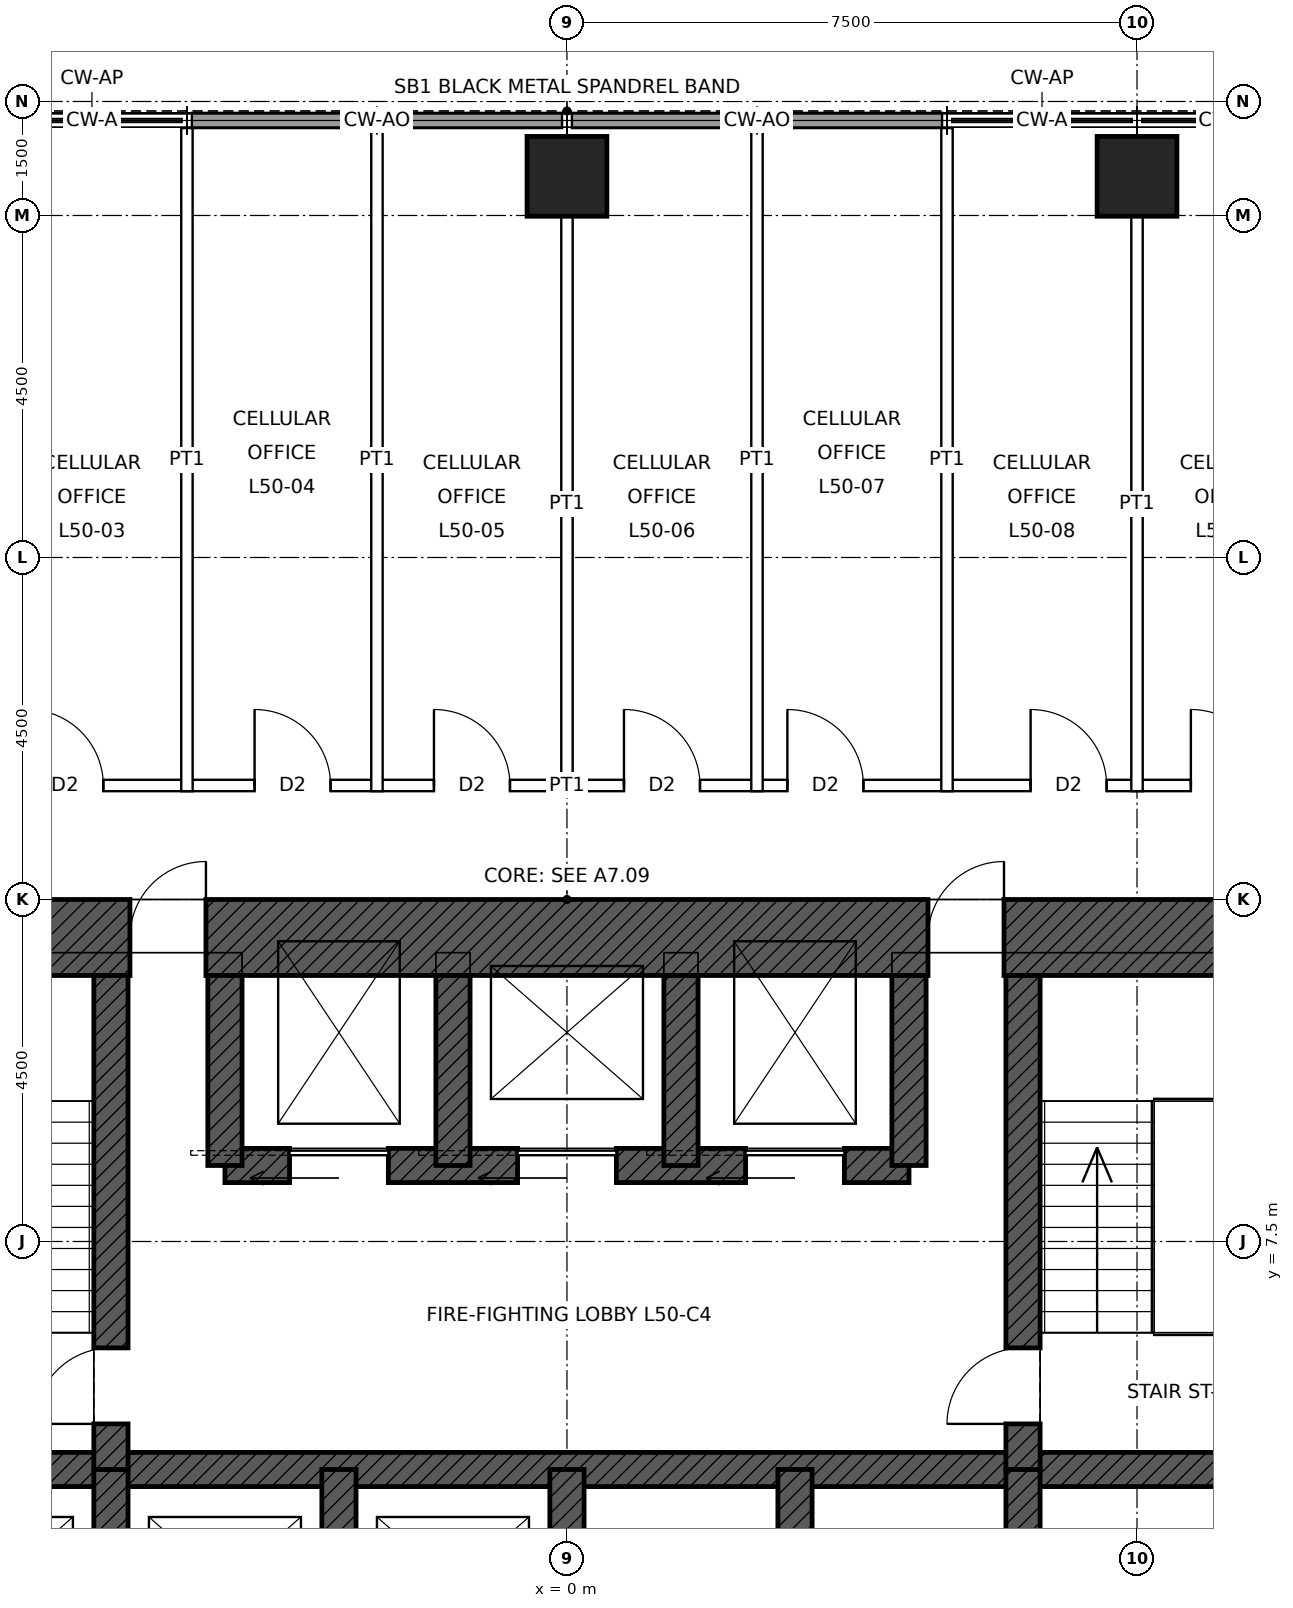
"""IFC4 building model, lengths in metres.
Left out: names, types, materials, properties, quantities, classifications, styles, units other than length and angle.
Written with IfcOpenShell. Run it as: python <this file> out.ifc"""

import sys

from ifc_helpers import new_model, si_unit, direction, frame, frame_2d, origin, origin_2d, place, context, subcontext, project, spatial, rectangle, hollow_rectangle, extrude, element, fill, save


model = new_model("IFC4")
c1 = context("Model", 3, precision=1e-05, world=origin(), true_north=direction((0.0, 1.0)))
c2 = subcontext(c1, "Body", "Model", "MODEL_VIEW")
j1 = project(units=[si_unit("LENGTHUNIT", "METRE"), si_unit("PLANEANGLEUNIT", "RADIAN")], contexts=[c1])
p1 = place(None, origin())
s1 = spatial("IfcSite", under=j1, at=p1, CompositionType="ELEMENT")
p2 = place(p1, origin())
s2 = spatial("IfcBuilding", under=s1, at=p2, CompositionType="ELEMENT")
p3 = place(p2, frame((0.0, 0.0, 233.9)))
s3 = spatial("IfcBuildingStorey", under=s2, at=p3, CompositionType="ELEMENT", Elevation=233.9)
for number, where, z_axis, x_axis in (
    (1, (0.0, 21.515, 0.0), (0.0, 0.0, 1.0), (1.0, 0.0, 0.0)),
    (2, (7.5, 21.515, 0.0), (0.0, 0.0, 1.0), (1.0, 0.0, 0.0)),
):
    element("IfcColumn", number, at=place(p3, frame(where, z_axis=z_axis, x_axis=x_axis)), inside=s3, PredefinedType="COLUMN", context=c2, shape_type="SweptSolid", body=[
        extrude(hollow_rectangle(XDim=1.05, YDim=1.05, WallThickness=0.07, at=origin_2d()), origin(), (0.0, 0.0, 1.0), 4.0),
    ])
p4 = place(p3, frame((-12.0, 11.5, 0.0), z_axis=(0.0, 0.0, 1.0), x_axis=(1.0, 0.0, 0.0)))
e3 = element("IfcWall", 3, at=p4, inside=s3, PredefinedType="SHEAR", context=c2, shape_type="SweptSolid", body=[
    extrude(rectangle(XDim=24.0, YDim=1.0, at=frame_2d((12.0, 0.0))), origin(), (0.0, 0.0, 1.0), 4.0),
])
p5 = place(p4, frame((6.25, 0.0, 0.0)))
e4 = element("IfcOpeningElement", 4, at=p5, cuts=e3, PredefinedType="OPENING", context=c2, shape_type="SweptSolid", body=[
    extrude(rectangle(XDim=1.0, YDim=2.4, at=frame_2d((0.5, 1.2))), frame((0.0, 0.51, 0.0), z_axis=(0.0, -1.0, 0.0), x_axis=(1.0, 0.0, 0.0)), (0.0, 0.0, 1.0), 1.02),
])
p6 = place(p4, frame((16.75, 0.0, 0.0)))
e5 = element("IfcOpeningElement", 5, at=p6, cuts=e3, PredefinedType="OPENING", context=c2, shape_type="SweptSolid", body=[
    extrude(rectangle(XDim=1.0, YDim=2.4, at=frame_2d((0.5, 1.2))), frame((0.0, 0.51, 0.0), z_axis=(0.0, -1.0, 0.0), x_axis=(1.0, 0.0, 0.0)), (0.0, 0.0, 1.0), 1.02),
])
p7 = place(p3, frame((-11.0, 4.5, 0.0), z_axis=(0.0, 0.0, 1.0), x_axis=(1.0, 0.0, 0.0)))
e6 = element("IfcWall", 6, at=p7, inside=s3, PredefinedType="SHEAR", context=c2, shape_type="SweptSolid", body=[
    extrude(rectangle(XDim=22.0, YDim=0.45, at=frame_2d((11.0, 0.0))), origin(), (0.0, 0.0, 1.0), 4.0),
])
p8 = place(p7, frame((0.4, 0.0, 0.0)))
e7 = element("IfcOpeningElement", 7, at=p8, cuts=e6, PredefinedType="OPENING", context=c2, shape_type="SweptSolid", body=[
    extrude(rectangle(XDim=1.0, YDim=2.1, at=frame_2d((0.5, 1.05))), frame((0.0, 0.235, 0.0), z_axis=(0.0, -1.0, 0.0), x_axis=(1.0, 0.0, 0.0)), (0.0, 0.0, 1.0), 0.47),
])
p9 = place(p7, frame((20.6, 0.0, 0.0)))
e8 = element("IfcOpeningElement", 8, at=p9, cuts=e6, PredefinedType="OPENING", context=c2, shape_type="SweptSolid", body=[
    extrude(rectangle(XDim=1.0, YDim=2.1, at=frame_2d((0.5, 1.05))), frame((0.0, 0.235, 0.0), z_axis=(0.0, -1.0, 0.0), x_axis=(1.0, 0.0, 0.0)), (0.0, 0.0, 1.0), 0.47),
])
p10 = place(p3, frame((-4.5, 8.5, 0.0), z_axis=(0.0, 0.0, 1.0), x_axis=(1.0, 0.0, 0.0)))
e9 = element("IfcWall", 9, at=p10, inside=s3, PredefinedType="SHEAR", context=c2, shape_type="SweptSolid", body=[
    extrude(rectangle(XDim=9.0, YDim=0.45, at=frame_2d((4.5, 0.0))), origin(), (0.0, 0.0, 1.0), 4.0),
])
p11 = place(p10, frame((0.85, 0.0, 0.0)))
e10 = element("IfcOpeningElement", 10, at=p11, cuts=e9, PredefinedType="OPENING", context=c2, shape_type="SweptSolid", body=[
    extrude(rectangle(XDim=1.3, YDim=2.4, at=frame_2d((0.65, 1.2))), frame((0.0, 0.235, 0.0), z_axis=(0.0, -1.0, 0.0), x_axis=(1.0, 0.0, 0.0)), (0.0, 0.0, 1.0), 0.47),
])
p12 = place(p10, frame((6.85, 0.0, 0.0)))
e11 = element("IfcOpeningElement", 11, at=p12, cuts=e9, PredefinedType="OPENING", context=c2, shape_type="SweptSolid", body=[
    extrude(rectangle(XDim=1.3, YDim=2.4, at=frame_2d((0.65, 1.2))), frame((0.0, 0.235, 0.0), z_axis=(0.0, -1.0, 0.0), x_axis=(1.0, 0.0, 0.0)), (0.0, 0.0, 1.0), 0.47),
])
p13 = place(p10, frame((3.85, 0.0, 0.0)))
e12 = element("IfcOpeningElement", 12, at=p13, cuts=e9, PredefinedType="OPENING", context=c2, shape_type="SweptSolid", body=[
    extrude(rectangle(XDim=1.3, YDim=2.4, at=frame_2d((0.65, 1.2))), frame((0.0, 0.235, 0.0), z_axis=(0.0, -1.0, 0.0), x_axis=(1.0, 0.0, 0.0)), (0.0, 0.0, 1.0), 0.47),
])
for number, where, z_axis, x_axis in (
    (13, (-6.0, 1.5, 0.0), (0.0, 0.0, 1.0), (0.0, 1.0, 0.0)),
    (14, (-3.0, 1.5, 0.0), (0.0, 0.0, 1.0), (0.0, 1.0, 0.0)),
    (15, (0.0, 1.5, 0.0), (0.0, 0.0, 1.0), (0.0, 1.0, 0.0)),
    (16, (3.0, 1.5, 0.0), (0.0, 0.0, 1.0), (0.0, 1.0, 0.0)),
    (17, (6.0, 1.5, 0.0), (0.0, 0.0, 1.0), (0.0, 1.0, 0.0)),
):
    element("IfcWall", number, at=place(p3, frame(where, z_axis=z_axis, x_axis=x_axis)), inside=s3, PredefinedType="SHEAR", context=c2, shape_type="SweptSolid", body=[
        extrude(rectangle(XDim=3.0, YDim=0.45, at=frame_2d((1.5, 0.0))), origin(), (0.0, 0.0, 1.0), 4.0),
    ])
p14 = place(p3, frame((-6.0, 4.5, 0.0), z_axis=(0.0, 0.0, 1.0), x_axis=(0.0, 1.0, 0.0)))
e18 = element("IfcWall", 18, at=p14, inside=s3, PredefinedType="SHEAR", context=c2, shape_type="SweptSolid", body=[
    extrude(rectangle(XDim=6.5, YDim=0.45, at=frame_2d((3.25, 0.0))), origin(), (0.0, 0.0, 1.0), 4.0),
])
p15 = place(p14, frame((0.6, 0.0, 0.0)))
e19 = element("IfcOpeningElement", 19, at=p15, cuts=e18, PredefinedType="OPENING", context=c2, shape_type="SweptSolid", body=[
    extrude(rectangle(XDim=1.0, YDim=2.1, at=frame_2d((0.5, 1.05))), frame((0.0, 0.235, 0.0), z_axis=(0.0, -1.0, 0.0), x_axis=(1.0, 0.0, 0.0)), (0.0, 0.0, 1.0), 0.47),
])
p16 = place(p3, frame((6.0, 4.5, 0.0), z_axis=(0.0, 0.0, 1.0), x_axis=(0.0, 1.0, 0.0)))
e20 = element("IfcWall", 20, at=p16, inside=s3, PredefinedType="SHEAR", context=c2, shape_type="SweptSolid", body=[
    extrude(rectangle(XDim=6.5, YDim=0.45, at=frame_2d((3.25, 0.0))), origin(), (0.0, 0.0, 1.0), 4.0),
])
p17 = place(p16, frame((0.6, 0.0, 0.0)))
e21 = element("IfcOpeningElement", 21, at=p17, cuts=e20, PredefinedType="OPENING", context=c2, shape_type="SweptSolid", body=[
    extrude(rectangle(XDim=1.0, YDim=2.1, at=frame_2d((0.5, 1.05))), frame((0.0, 0.235, 0.0), z_axis=(0.0, -1.0, 0.0), x_axis=(1.0, 0.0, 0.0)), (0.0, 0.0, 1.0), 0.47),
])
for number, where, z_axis, x_axis in (
    (22, (-4.5, 8.5, 0.0), (0.0, 0.0, 1.0), (0.0, 1.0, 0.0)),
    (23, (4.5, 8.5, 0.0), (0.0, 0.0, 1.0), (0.0, 1.0, 0.0)),
    (24, (-1.5, 8.5, 0.0), (0.0, 0.0, 1.0), (0.0, 1.0, 0.0)),
    (25, (1.5, 8.5, 0.0), (0.0, 0.0, 1.0), (0.0, 1.0, 0.0)),
):
    element("IfcWall", number, at=place(p3, frame(where, z_axis=z_axis, x_axis=x_axis)), inside=s3, PredefinedType="SHEAR", context=c2, shape_type="SweptSolid", body=[
        extrude(rectangle(XDim=2.5, YDim=0.45, at=frame_2d((1.25, 0.0))), origin(), (0.0, 0.0, 1.0), 4.0),
    ])
for number, where, z_axis, x_axis in (
    (26, (-4.935, 22.25, 0.0), (0.0, 0.0, 1.0), (1.0, 0.0, 0.0)),
    (27, (-2.468, 22.25, 0.0), (0.0, 0.0, 1.0), (1.0, 0.0, 0.0)),
    (28, (0.065, 22.25, 0.0), (0.0, 0.0, 1.0), (1.0, 0.0, 0.0)),
    (29, (2.532, 22.25, 0.0), (0.0, 0.0, 1.0), (1.0, 0.0, 0.0)),
):
    element("IfcWall", number, at=place(p3, frame(where, z_axis=z_axis, x_axis=x_axis)), inside=s3, PredefinedType="SOLIDWALL", context=c2, shape_type="SweptSolid", body=[
        extrude(rectangle(XDim=2.403, YDim=0.2, at=frame_2d((1.201, 0.0))), origin(), (0.0, 0.0, 1.0), 3.85),
    ])
p18 = place(p3, frame((-13.575, 13.5, 0.0), z_axis=(0.0, 0.0, 1.0), x_axis=(1.0, 0.0, 0.0)))
e30 = element("IfcWall", 30, at=p18, inside=s3, PredefinedType="PARTITIONING", context=c2, shape_type="SweptSolid", body=[
    extrude(rectangle(XDim=27.15, YDim=0.15, at=frame_2d((13.575, 0.0))), origin(), (0.0, 0.0, 1.0), 3.85),
])
p19 = place(p18, frame((4.366, 0.0, 0.0)))
e31 = element("IfcOpeningElement", 31, at=p19, cuts=e30, PredefinedType="OPENING", context=c2, shape_type="SweptSolid", body=[
    extrude(rectangle(XDim=1.0, YDim=2.1, at=frame_2d((0.5, 1.05))), frame((0.0, 0.085, 0.0), z_axis=(0.0, -1.0, 0.0), x_axis=(1.0, 0.0, 0.0)), (0.0, 0.0, 1.0), 0.17),
])
p20 = place(p18, frame((6.475, 0.0, 0.0)))
e32 = element("IfcOpeningElement", 32, at=p20, cuts=e30, PredefinedType="OPENING", context=c2, shape_type="SweptSolid", body=[
    extrude(rectangle(XDim=1.0, YDim=2.1, at=frame_2d((0.5, 1.05))), frame((0.0, 0.085, 0.0), z_axis=(0.0, -1.0, 0.0), x_axis=(1.0, 0.0, 0.0)), (0.0, 0.0, 1.0), 0.17),
])
p21 = place(p18, frame((9.465, 0.0, 0.0)))
e33 = element("IfcOpeningElement", 33, at=p21, cuts=e30, PredefinedType="OPENING", context=c2, shape_type="SweptSolid", body=[
    extrude(rectangle(XDim=1.0, YDim=2.1, at=frame_2d((0.5, 1.05))), frame((0.0, 0.085, 0.0), z_axis=(0.0, -1.0, 0.0), x_axis=(1.0, 0.0, 0.0)), (0.0, 0.0, 1.0), 0.17),
])
p22 = place(p18, frame((11.825, 0.0, 0.0)))
e34 = element("IfcOpeningElement", 34, at=p22, cuts=e30, PredefinedType="OPENING", context=c2, shape_type="SweptSolid", body=[
    extrude(rectangle(XDim=1.0, YDim=2.1, at=frame_2d((0.5, 1.05))), frame((0.0, 0.085, 0.0), z_axis=(0.0, -1.0, 0.0), x_axis=(1.0, 0.0, 0.0)), (0.0, 0.0, 1.0), 0.17),
])
p23 = place(p18, frame((14.325, 0.0, 0.0)))
e35 = element("IfcOpeningElement", 35, at=p23, cuts=e30, PredefinedType="OPENING", context=c2, shape_type="SweptSolid", body=[
    extrude(rectangle(XDim=1.0, YDim=2.1, at=frame_2d((0.5, 1.05))), frame((0.0, 0.085, 0.0), z_axis=(0.0, -1.0, 0.0), x_axis=(1.0, 0.0, 0.0)), (0.0, 0.0, 1.0), 0.17),
])
p24 = place(p18, frame((16.475, 0.0, 0.0)))
e36 = element("IfcOpeningElement", 36, at=p24, cuts=e30, PredefinedType="OPENING", context=c2, shape_type="SweptSolid", body=[
    extrude(rectangle(XDim=1.0, YDim=2.1, at=frame_2d((0.5, 1.05))), frame((0.0, 0.085, 0.0), z_axis=(0.0, -1.0, 0.0), x_axis=(1.0, 0.0, 0.0)), (0.0, 0.0, 1.0), 0.17),
])
p25 = place(p18, frame((19.675, 0.0, 0.0)))
e37 = element("IfcOpeningElement", 37, at=p25, cuts=e30, PredefinedType="OPENING", context=c2, shape_type="SweptSolid", body=[
    extrude(rectangle(XDim=1.0, YDim=2.1, at=frame_2d((0.5, 1.05))), frame((0.0, 0.085, 0.0), z_axis=(0.0, -1.0, 0.0), x_axis=(1.0, 0.0, 0.0)), (0.0, 0.0, 1.0), 0.17),
])
p26 = place(p18, frame((21.783, 0.0, 0.0)))
e38 = element("IfcOpeningElement", 38, at=p26, cuts=e30, PredefinedType="OPENING", context=c2, shape_type="SweptSolid", body=[
    extrude(rectangle(XDim=1.0, YDim=2.1, at=frame_2d((0.5, 1.05))), frame((0.0, 0.085, 0.0), z_axis=(0.0, -1.0, 0.0), x_axis=(1.0, 0.0, 0.0)), (0.0, 0.0, 1.0), 0.17),
])
p27 = place(p18, frame((24.783, 0.0, 0.0)))
e39 = element("IfcOpeningElement", 39, at=p27, cuts=e30, PredefinedType="OPENING", context=c2, shape_type="SweptSolid", body=[
    extrude(rectangle(XDim=1.0, YDim=2.4, at=frame_2d((0.5, 1.2))), frame((0.0, 0.085, 0.0), z_axis=(0.0, -1.0, 0.0), x_axis=(1.0, 0.0, 0.0)), (0.0, 0.0, 1.0), 0.17),
])
p28 = place(p18, frame((1.366, 0.0, 0.0)))
e40 = element("IfcOpeningElement", 40, at=p28, cuts=e30, PredefinedType="OPENING", context=c2, shape_type="SweptSolid", body=[
    extrude(rectangle(XDim=1.0, YDim=2.4, at=frame_2d((0.5, 1.2))), frame((0.0, 0.085, 0.0), z_axis=(0.0, -1.0, 0.0), x_axis=(1.0, 0.0, 0.0)), (0.0, 0.0, 1.0), 0.17),
])
for number, where, z_axis, x_axis in (
    (41, (-5.0, 13.425, 0.0), (0.0, 0.0, 1.0), (0.0, 1.0, 0.0)),
    (42, (-2.5, 13.425, 0.0), (0.0, 0.0, 1.0), (0.0, 1.0, 0.0)),
):
    element("IfcWall", number, at=place(p3, frame(where, z_axis=z_axis, x_axis=x_axis)), inside=s3, PredefinedType="PARTITIONING", context=c2, shape_type="SweptSolid", body=[
        extrude(rectangle(XDim=8.725, YDim=0.15, at=frame_2d((4.362, 0.0))), origin(), (0.0, 0.0, 1.0), 3.85),
    ])
p29 = place(p3, frame((0.0, 13.425, 0.0), z_axis=(0.0, 0.0, 1.0), x_axis=(0.0, 1.0, 0.0)))
e43 = element("IfcWall", 43, at=p29, inside=s3, PredefinedType="PARTITIONING", context=c2, shape_type="SweptSolid", body=[
    extrude(rectangle(XDim=7.565, YDim=0.15, at=frame_2d((3.782, 0.0))), origin(), (0.0, 0.0, 1.0), 3.238),
])
for number, where, z_axis, x_axis in (
    (44, (2.5, 13.425, 0.0), (0.0, 0.0, 1.0), (0.0, 1.0, 0.0)),
    (45, (5.0, 13.425, 0.0), (0.0, 0.0, 1.0), (0.0, 1.0, 0.0)),
):
    element("IfcWall", number, at=place(p3, frame(where, z_axis=z_axis, x_axis=x_axis)), inside=s3, PredefinedType="PARTITIONING", context=c2, shape_type="SweptSolid", body=[
        extrude(rectangle(XDim=8.725, YDim=0.15, at=frame_2d((4.362, 0.0))), origin(), (0.0, 0.0, 1.0), 3.85),
    ])
p30 = place(p3, frame((7.5, 13.425, 0.0), z_axis=(0.0, 0.0, 1.0), x_axis=(0.0, 1.0, 0.0)))
e46 = element("IfcWall", 46, at=p30, inside=s3, PredefinedType="PARTITIONING", context=c2, shape_type="SweptSolid", body=[
    extrude(rectangle(XDim=7.565, YDim=0.15, at=frame_2d((3.782, 0.0))), origin(), (0.0, 0.0, 1.0), 3.238),
])
p31 = place(p15, origin())
e47 = element("IfcDoor", 47, at=p31, inside=s3, OperationType="SINGLE_SWING_LEFT", PredefinedType="DOOR", context=c2, shape_type="SweptSolid", body=[
    extrude(rectangle(XDim=1.0, YDim=2.1, at=frame_2d((0.5, 1.05))), frame((0.0, 0.025, 0.0), z_axis=(0.0, -1.0, 0.0), x_axis=(1.0, 0.0, 0.0)), (0.0, 0.0, 1.0), 0.05),
])
fill(e19, e47)
p32 = place(p17, origin())
e48 = element("IfcDoor", 48, at=p32, inside=s3, OperationType="SINGLE_SWING_LEFT", PredefinedType="DOOR", context=c2, shape_type="SweptSolid", body=[
    extrude(rectangle(XDim=1.0, YDim=2.1, at=frame_2d((0.5, 1.05))), frame((0.0, 0.025, 0.0), z_axis=(0.0, -1.0, 0.0), x_axis=(1.0, 0.0, 0.0)), (0.0, 0.0, 1.0), 0.05),
])
fill(e21, e48)
p33 = place(p5, origin())
e49 = element("IfcDoor", 49, at=p33, inside=s3, OperationType="SINGLE_SWING_RIGHT", PredefinedType="DOOR", context=c2, shape_type="SweptSolid", body=[
    extrude(rectangle(XDim=1.0, YDim=2.4, at=frame_2d((0.5, 1.2))), frame((0.0, 0.485, 0.0), z_axis=(0.0, -1.0, 0.0), x_axis=(1.0, 0.0, 0.0)), (0.0, 0.0, 1.0), 0.05),
])
fill(e4, e49)
p34 = place(p6, origin())
e50 = element("IfcDoor", 50, at=p34, inside=s3, OperationType="SINGLE_SWING_RIGHT", PredefinedType="DOOR", context=c2, shape_type="SweptSolid", body=[
    extrude(rectangle(XDim=1.0, YDim=2.4, at=frame_2d((0.5, 1.2))), frame((0.0, 0.485, 0.0), z_axis=(0.0, -1.0, 0.0), x_axis=(1.0, 0.0, 0.0)), (0.0, 0.0, 1.0), 0.05),
])
fill(e5, e50)
p35 = place(p11, origin())
e51 = element("IfcDoor", 51, at=p35, inside=s3, OperationType="SLIDING_TO_LEFT", PredefinedType="DOOR", context=c2, shape_type="SweptSolid", body=[
    extrude(rectangle(XDim=1.3, YDim=2.4, at=frame_2d((0.65, 1.2))), frame((0.0, 0.025, 0.0), z_axis=(0.0, -1.0, 0.0), x_axis=(1.0, 0.0, 0.0)), (0.0, 0.0, 1.0), 0.05),
])
fill(e10, e51)
p36 = place(p12, origin())
e52 = element("IfcDoor", 52, at=p36, inside=s3, OperationType="SLIDING_TO_LEFT", PredefinedType="DOOR", context=c2, shape_type="SweptSolid", body=[
    extrude(rectangle(XDim=1.3, YDim=2.4, at=frame_2d((0.65, 1.2))), frame((0.0, 0.025, 0.0), z_axis=(0.0, -1.0, 0.0), x_axis=(1.0, 0.0, 0.0)), (0.0, 0.0, 1.0), 0.05),
])
fill(e11, e52)
p37 = place(p13, origin())
e53 = element("IfcDoor", 53, at=p37, inside=s3, OperationType="SLIDING_TO_LEFT", PredefinedType="DOOR", context=c2, shape_type="SweptSolid", body=[
    extrude(rectangle(XDim=1.3, YDim=2.4, at=frame_2d((0.65, 1.2))), frame((0.0, 0.025, 0.0), z_axis=(0.0, -1.0, 0.0), x_axis=(1.0, 0.0, 0.0)), (0.0, 0.0, 1.0), 0.05),
])
fill(e12, e53)
p38 = place(p20, origin())
e54 = element("IfcDoor", 54, at=p38, inside=s3, OperationType="SINGLE_SWING_LEFT", PredefinedType="DOOR", context=c2, shape_type="SweptSolid", body=[
    extrude(rectangle(XDim=1.0, YDim=2.1, at=frame_2d((0.5, 1.05))), frame((0.0, 0.025, 0.0), z_axis=(0.0, -1.0, 0.0), x_axis=(1.0, 0.0, 0.0)), (0.0, 0.0, 1.0), 0.05),
])
fill(e32, e54)
p39 = place(p21, origin())
e55 = element("IfcDoor", 55, at=p39, inside=s3, OperationType="SINGLE_SWING_LEFT", PredefinedType="DOOR", context=c2, shape_type="SweptSolid", body=[
    extrude(rectangle(XDim=1.0, YDim=2.1, at=frame_2d((0.5, 1.05))), frame((0.0, 0.025, 0.0), z_axis=(0.0, -1.0, 0.0), x_axis=(1.0, 0.0, 0.0)), (0.0, 0.0, 1.0), 0.05),
])
fill(e33, e55)
p40 = place(p22, origin())
e56 = element("IfcDoor", 56, at=p40, inside=s3, OperationType="SINGLE_SWING_LEFT", PredefinedType="DOOR", context=c2, shape_type="SweptSolid", body=[
    extrude(rectangle(XDim=1.0, YDim=2.1, at=frame_2d((0.5, 1.05))), frame((0.0, 0.025, 0.0), z_axis=(0.0, -1.0, 0.0), x_axis=(1.0, 0.0, 0.0)), (0.0, 0.0, 1.0), 0.05),
])
fill(e34, e56)
p41 = place(p23, origin())
e57 = element("IfcDoor", 57, at=p41, inside=s3, OperationType="SINGLE_SWING_LEFT", PredefinedType="DOOR", context=c2, shape_type="SweptSolid", body=[
    extrude(rectangle(XDim=1.0, YDim=2.1, at=frame_2d((0.5, 1.05))), frame((0.0, 0.025, 0.0), z_axis=(0.0, -1.0, 0.0), x_axis=(1.0, 0.0, 0.0)), (0.0, 0.0, 1.0), 0.05),
])
fill(e35, e57)
p42 = place(p24, origin())
e58 = element("IfcDoor", 58, at=p42, inside=s3, OperationType="SINGLE_SWING_LEFT", PredefinedType="DOOR", context=c2, shape_type="SweptSolid", body=[
    extrude(rectangle(XDim=1.0, YDim=2.1, at=frame_2d((0.5, 1.05))), frame((0.0, 0.025, 0.0), z_axis=(0.0, -1.0, 0.0), x_axis=(1.0, 0.0, 0.0)), (0.0, 0.0, 1.0), 0.05),
])
fill(e36, e58)
p43 = place(p25, origin())
e59 = element("IfcDoor", 59, at=p43, inside=s3, OperationType="SINGLE_SWING_LEFT", PredefinedType="DOOR", context=c2, shape_type="SweptSolid", body=[
    extrude(rectangle(XDim=1.0, YDim=2.1, at=frame_2d((0.5, 1.05))), frame((0.0, 0.025, 0.0), z_axis=(0.0, -1.0, 0.0), x_axis=(1.0, 0.0, 0.0)), (0.0, 0.0, 1.0), 0.05),
])
fill(e37, e59)
p44 = place(p26, origin())
e60 = element("IfcDoor", 60, at=p44, inside=s3, OperationType="SINGLE_SWING_LEFT", PredefinedType="DOOR", context=c2, shape_type="SweptSolid", body=[
    extrude(rectangle(XDim=1.0, YDim=2.1, at=frame_2d((0.5, 1.05))), frame((0.0, 0.025, 0.0), z_axis=(0.0, -1.0, 0.0), x_axis=(1.0, 0.0, 0.0)), (0.0, 0.0, 1.0), 0.05),
])
fill(e38, e60)
save(model, sys.argv[1])
